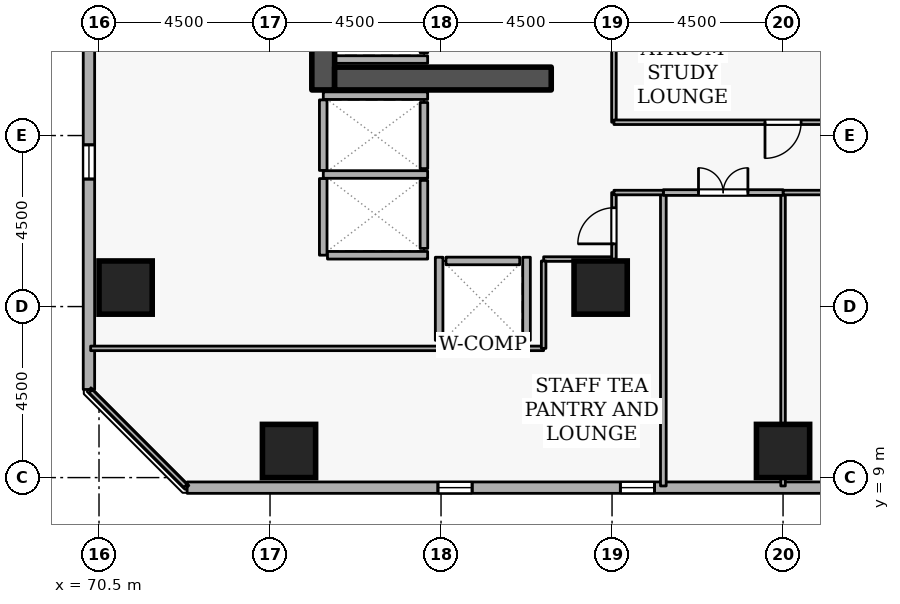
"""IFC4 building model, lengths in metres.
Left out: names, types, materials, properties, quantities, classifications, styles, units other than length and angle.
Written with IfcOpenShell. Run it as: python <this file> out.ifc"""

import sys

from ifc_helpers import new_model, si_unit, direction, frame, frame_2d, origin, origin_2d, place, context, subcontext, project, spatial, rectangle, extrude, element, fill, save


model = new_model("IFC4")
c1 = context("Model", 3, precision=1e-05, world=origin(), true_north=direction((0.0, 1.0)))
c2 = subcontext(c1, "Body", "Model", "MODEL_VIEW")
j1 = project(units=[si_unit("LENGTHUNIT", "METRE"), si_unit("PLANEANGLEUNIT", "RADIAN")], contexts=[c1])
p1 = place(None, origin())
s1 = spatial("IfcSite", under=j1, at=p1, CompositionType="ELEMENT")
p2 = place(p1, origin())
s2 = spatial("IfcBuilding", under=s1, at=p2, CompositionType="ELEMENT")
p3 = place(p2, frame((0.0, 0.0, 64.5)))
s3 = spatial("IfcBuildingStorey", under=s2, at=p3, CompositionType="ELEMENT", Elevation=64.5)
p4 = place(p3, frame((76.4, 19.2, 0.0), z_axis=(0.0, 0.0, 1.0), x_axis=(0.0, 1.0, 0.0)))
e1 = element("IfcWall", 1, at=p4, inside=s3, PredefinedType="SHEAR", context=c2, shape_type="SweptSolid", body=[
    extrude(rectangle(XDim=15.6, YDim=0.6, at=frame_2d((7.8, 0.0))), origin(), (0.0, 0.0, 1.0), 3.6),
])
p5 = place(p3, frame((76.7, 19.5, 0.0), z_axis=(0.0, 0.0, 1.0), x_axis=(1.0, 0.0, 0.0)))
e2 = element("IfcWall", 2, at=p5, inside=s3, PredefinedType="SHEAR", context=c2, shape_type="SweptSolid", body=[
    extrude(rectangle(XDim=5.7, YDim=0.6, at=frame_2d((2.85, 0.0))), origin(), (0.0, 0.0, 1.0), 3.6),
])
for number, where, z_axis, x_axis in (
    (3, (71.2, 14.0, 0.0), (0.0, 0.0, 1.0), (1.0, 0.0, 0.0)),
    (4, (88.5, 9.7, 0.0), (0.0, 0.0, 1.0), (1.0, 0.0, 0.0)),
    (5, (75.5, 9.7, 0.0), (0.0, 0.0, 1.0), (1.0, 0.0, 0.0)),
    (6, (83.7, 14.0, 0.0), (0.0, 0.0, 1.0), (1.0, 0.0, 0.0)),
):
    element("IfcColumn", number, at=place(p3, frame(where, z_axis=z_axis, x_axis=x_axis)), inside=s3, PredefinedType="COLUMN", context=c2, shape_type="SweptSolid", body=[
        extrude(rectangle(XDim=1.4, YDim=1.4, at=origin_2d()), origin(), (0.0, 0.0, 1.0), 3.6),
    ])
p6 = place(p3, frame((72.819, 8.735, 0.0), z_axis=(0.0, 0.0, 1.0), x_axis=(0.999999999457, 3.2959355e-05, 0.0)))
e7 = element("IfcWall", 7, at=p6, inside=s3, PredefinedType="STANDARD", context=c2, shape_type="SweptSolid", body=[
    extrude(rectangle(XDim=37.037, YDim=0.3, at=frame_2d((18.518, 0.0))), origin(), (0.0, 0.0, 1.0), 2.7),
])
p7 = place(p6, frame((6.6, 0.0, 0.72)))
e8 = element("IfcOpeningElement", 8, at=p7, cuts=e7, PredefinedType="OPENING", context=c2, shape_type="SweptSolid", body=[
    extrude(rectangle(XDim=0.9, YDim=1.75, at=frame_2d((0.45, 0.875))), frame((0.0, 0.16, 0.0), z_axis=(0.0, -1.0, 0.0), x_axis=(1.0, 0.0, 0.0)), (0.0, 0.0, 1.0), 0.32),
])
p8 = place(p6, frame((11.4, 0.0, 0.72)))
e9 = element("IfcOpeningElement", 9, at=p8, cuts=e7, PredefinedType="OPENING", context=c2, shape_type="SweptSolid", body=[
    extrude(rectangle(XDim=0.9, YDim=1.75, at=frame_2d((0.45, 0.875))), frame((0.0, 0.16, 0.0), z_axis=(0.0, -1.0, 0.0), x_axis=(1.0, 0.0, 0.0)), (0.0, 0.0, 1.0), 0.32),
])
p9 = place(p6, frame((21.0, 0.0, 0.72)))
e10 = element("IfcOpeningElement", 10, at=p9, cuts=e7, PredefinedType="OPENING", context=c2, shape_type="SweptSolid", body=[
    extrude(rectangle(XDim=0.9, YDim=1.75, at=frame_2d((0.45, 0.875))), frame((0.0, 0.16, 0.0), z_axis=(0.0, -1.0, 0.0), x_axis=(1.0, 0.0, 0.0)), (0.0, 0.0, 1.0), 0.32),
])
p10 = place(p6, frame((25.8, 0.0, 0.72)))
e11 = element("IfcOpeningElement", 11, at=p10, cuts=e7, PredefinedType="OPENING", context=c2, shape_type="SweptSolid", body=[
    extrude(rectangle(XDim=0.9, YDim=1.75, at=frame_2d((0.45, 0.875))), frame((0.0, 0.16, 0.0), z_axis=(0.0, -1.0, 0.0), x_axis=(1.0, 0.0, 0.0)), (0.0, 0.0, 1.0), 0.32),
])
p11 = place(p3, frame((70.236, 48.355, 0.0), z_axis=(0.0, 0.0, 1.0), x_axis=(-3.2959355e-05, -0.999999999457, 0.0)))
e12 = element("IfcWall", 12, at=p11, inside=s3, PredefinedType="STANDARD", context=c2, shape_type="SweptSolid", body=[
    extrude(rectangle(XDim=37.037, YDim=0.3, at=frame_2d((18.518, 0.0))), origin(), (0.0, 0.0, 1.0), 2.7),
])
p12 = place(p11, frame((1.8, 0.0, 0.72)))
e13 = element("IfcOpeningElement", 13, at=p12, cuts=e12, PredefinedType="OPENING", context=c2, shape_type="SweptSolid", body=[
    extrude(rectangle(XDim=0.9, YDim=1.75, at=frame_2d((0.45, 0.875))), frame((0.0, 0.16, 0.0), z_axis=(0.0, -1.0, 0.0), x_axis=(1.0, 0.0, 0.0)), (0.0, 0.0, 1.0), 0.32),
])
p13 = place(p11, frame((11.4, 0.0, 0.72)))
e14 = element("IfcOpeningElement", 14, at=p13, cuts=e12, PredefinedType="OPENING", context=c2, shape_type="SweptSolid", body=[
    extrude(rectangle(XDim=0.9, YDim=1.75, at=frame_2d((0.45, 0.875))), frame((0.0, 0.16, 0.0), z_axis=(0.0, -1.0, 0.0), x_axis=(1.0, 0.0, 0.0)), (0.0, 0.0, 1.0), 0.32),
])
p14 = place(p11, frame((16.2, 0.0, 0.72)))
e15 = element("IfcOpeningElement", 15, at=p14, cuts=e12, PredefinedType="OPENING", context=c2, shape_type="SweptSolid", body=[
    extrude(rectangle(XDim=0.9, YDim=1.75, at=frame_2d((0.45, 0.875))), frame((0.0, 0.16, 0.0), z_axis=(0.0, -1.0, 0.0), x_axis=(1.0, 0.0, 0.0)), (0.0, 0.0, 1.0), 0.32),
])
p15 = place(p11, frame((25.8, 0.0, 0.72)))
e16 = element("IfcOpeningElement", 16, at=p15, cuts=e12, PredefinedType="OPENING", context=c2, shape_type="SweptSolid", body=[
    extrude(rectangle(XDim=0.9, YDim=1.75, at=frame_2d((0.45, 0.875))), frame((0.0, 0.16, 0.0), z_axis=(0.0, -1.0, 0.0), x_axis=(1.0, 0.0, 0.0)), (0.0, 0.0, 1.0), 0.32),
])
p16 = place(p11, frame((30.6, 0.0, 0.72)))
e17 = element("IfcOpeningElement", 17, at=p16, cuts=e12, PredefinedType="OPENING", context=c2, shape_type="SweptSolid", body=[
    extrude(rectangle(XDim=0.9, YDim=1.75, at=frame_2d((0.45, 0.875))), frame((0.0, 0.16, 0.0), z_axis=(0.0, -1.0, 0.0), x_axis=(1.0, 0.0, 0.0)), (0.0, 0.0, 1.0), 0.32),
])
p17 = place(p3, frame((79.05, 20.18, 0.0), z_axis=(0.0, 0.0, 1.0), x_axis=(0.0, 1.0, 0.0)))
e18 = element("IfcWall", 18, at=p17, inside=s3, PredefinedType="STANDARD", context=c2, shape_type="SweptSolid", body=[
    extrude(rectangle(XDim=1.94, YDim=0.2, at=frame_2d((0.97, 0.0))), origin(), (0.0, 0.0, 1.0), 3.34),
])
p18 = place(p3, frame((79.05, 17.13, 0.0), z_axis=(0.0, 0.0, 1.0), x_axis=(0.0, 1.0, 0.0)))
e19 = element("IfcWall", 19, at=p18, inside=s3, PredefinedType="STANDARD", context=c2, shape_type="SweptSolid", body=[
    extrude(rectangle(XDim=1.74, YDim=0.2, at=frame_2d((0.87, 0.0))), origin(), (0.0, 0.0, 1.0), 3.34),
])
p19 = place(p3, frame((79.05, 15.03, 0.0), z_axis=(0.0, 0.0, 1.0), x_axis=(0.0, 1.0, 0.0)))
e20 = element("IfcWall", 20, at=p19, inside=s3, PredefinedType="STANDARD", context=c2, shape_type="SweptSolid", body=[
    extrude(rectangle(XDim=1.79, YDim=0.2, at=frame_2d((0.895, 0.0))), origin(), (0.0, 0.0, 1.0), 3.34),
])
p20 = place(p3, frame((79.63, 14.7, 0.0), z_axis=(0.0, 0.0, 1.0), x_axis=(1.0, 0.0, 0.0)))
e21 = element("IfcWall", 21, at=p20, inside=s3, PredefinedType="STANDARD", context=c2, shape_type="SweptSolid", body=[
    extrude(rectangle(XDim=1.94, YDim=0.2, at=frame_2d((0.97, 0.0))), origin(), (0.0, 0.0, 1.0), 3.34),
])
p21 = place(p3, frame((76.712, 20.0, 0.0), z_axis=(0.0, 0.0, 1.0), x_axis=(1.0, 0.0, 0.0)))
e22 = element("IfcWall", 22, at=p21, inside=s3, PredefinedType="STANDARD", context=c2, shape_type="SweptSolid", body=[
    extrude(rectangle(XDim=2.436, YDim=0.2, at=frame_2d((1.218, 0.0))), origin(), (0.0, 0.0, 1.0), 3.34),
])
p22 = place(p3, frame((76.402, 19.05, 0.0), z_axis=(0.0, 0.0, 1.0), x_axis=(1.0, 0.0, 0.0)))
e23 = element("IfcWall", 23, at=p22, inside=s3, PredefinedType="STANDARD", context=c2, shape_type="SweptSolid", body=[
    extrude(rectangle(XDim=2.746, YDim=0.2, at=frame_2d((1.373, 0.0))), origin(), (0.0, 0.0, 1.0), 2.545),
])
p23 = place(p3, frame((76.402, 16.975, 0.0), z_axis=(0.0, 0.0, 1.0), x_axis=(1.0, 0.0, 0.0)))
e24 = element("IfcWall", 24, at=p23, inside=s3, PredefinedType="STANDARD", context=c2, shape_type="SweptSolid", body=[
    extrude(rectangle(XDim=2.746, YDim=0.2, at=frame_2d((1.373, 0.0))), origin(), (0.0, 0.0, 1.0), 3.34),
])
p24 = place(p3, frame((76.4, 14.852, 0.0), z_axis=(0.0, 0.0, 1.0), x_axis=(0.0, 1.0, 0.0)))
e25 = element("IfcWall", 25, at=p24, inside=s3, PredefinedType="STANDARD", context=c2, shape_type="SweptSolid", body=[
    extrude(rectangle(XDim=2.016, YDim=0.2, at=frame_2d((1.008, 0.0))), origin(), (0.0, 0.0, 1.0), 3.34),
])
p25 = place(p3, frame((76.4, 17.082, 0.0), z_axis=(0.0, 0.0, 1.0), x_axis=(0.0, 1.0, 0.0)))
e26 = element("IfcWall", 26, at=p25, inside=s3, PredefinedType="STANDARD", context=c2, shape_type="SweptSolid", body=[
    extrude(rectangle(XDim=1.856, YDim=0.2, at=frame_2d((0.928, 0.0))), origin(), (0.0, 0.0, 1.0), 3.34),
])
p26 = place(p3, frame((76.512, 14.85, 0.0), z_axis=(0.0, 0.0, 1.0), x_axis=(1.0, 0.0, 0.0)))
e27 = element("IfcWall", 27, at=p26, inside=s3, PredefinedType="STANDARD", context=c2, shape_type="SweptSolid", body=[
    extrude(rectangle(XDim=2.636, YDim=0.2, at=frame_2d((1.318, 0.0))), origin(), (0.0, 0.0, 1.0), 3.34),
])
p27 = place(p3, frame((79.452, 12.5, 0.0), z_axis=(0.0, 0.0, 1.0), x_axis=(1.0, 0.0, 0.0)))
e28 = element("IfcWall", 28, at=p27, inside=s3, PredefinedType="STANDARD", context=c2, shape_type="SweptSolid", body=[
    extrude(rectangle(XDim=2.296, YDim=0.2, at=frame_2d((1.148, 0.0))), origin(), (0.0, 0.0, 1.0), 3.34),
])
for number, where, z_axis, x_axis in (
    (29, (81.75, 12.612, 0.0), (0.0, 0.0, 1.0), (0.0, 1.0, 0.0)),
    (30, (79.45, 12.612, 0.0), (0.0, 0.0, 1.0), (0.0, 1.0, 0.0)),
):
    element("IfcWall", number, at=place(p3, frame(where, z_axis=z_axis, x_axis=x_axis)), inside=s3, PredefinedType="STANDARD", context=c2, shape_type="SweptSolid", body=[
        extrude(rectangle(XDim=2.186, YDim=0.2, at=frame_2d((1.093, 0.0))), origin(), (0.0, 0.0, 1.0), 3.34),
    ])
p28 = place(p3, frame((88.5, 8.78, 0.0), z_axis=(0.0, 0.0, 1.0), x_axis=(0.0, 1.0, 0.0)))
e31 = element("IfcWall", 31, at=p28, inside=s3, PredefinedType="PARTITIONING", context=c2, shape_type="SweptSolid", body=[
    extrude(rectangle(XDim=7.72, YDim=0.12, at=frame_2d((3.86, 0.0))), origin(), (0.0, 0.0, 1.0), 2.878),
])
p29 = place(p3, frame((88.5, 16.5, 0.0), z_axis=(0.0, 0.0, 1.0), x_axis=(1.0, 0.0, 0.0)))
e32 = element("IfcWall", 32, at=p29, inside=s3, PredefinedType="PARTITIONING", context=c2, shape_type="SweptSolid", body=[
    extrude(rectangle(XDim=4.45, YDim=0.12, at=frame_2d((2.225, 0.0))), origin(), (0.0, 0.0, 1.0), 3.34),
])
p30 = place(p3, frame((85.35, 8.78, 0.0), z_axis=(0.0, 0.0, 1.0), x_axis=(0.0, 1.0, 0.0)))
e33 = element("IfcWall", 33, at=p30, inside=s3, PredefinedType="PARTITIONING", context=c2, shape_type="SweptSolid", body=[
    extrude(rectangle(XDim=7.72, YDim=0.15, at=frame_2d((3.86, 0.0))), origin(), (0.0, 0.0, 1.0), 3.34),
])
p31 = place(p3, frame((85.35, 16.5, 0.0), z_axis=(0.0, 0.0, 1.0), x_axis=(1.0, 0.0, 0.0)))
e34 = element("IfcWall", 34, at=p31, inside=s3, PredefinedType="PARTITIONING", context=c2, shape_type="SweptSolid", body=[
    extrude(rectangle(XDim=3.15, YDim=0.15, at=frame_2d((1.575, 0.0))), origin(), (0.0, 0.0, 1.0), 3.34),
])
p32 = place(p31, frame((0.925, 0.0, 0.0)))
e35 = element("IfcOpeningElement", 35, at=p32, cuts=e34, PredefinedType="OPENING", context=c2, shape_type="SweptSolid", body=[
    extrude(rectangle(XDim=1.3, YDim=2.12, at=frame_2d((0.65, 1.06))), frame((0.0, 0.085, 0.0), z_axis=(0.0, -1.0, 0.0), x_axis=(1.0, 0.0, 0.0)), (0.0, 0.0, 1.0), 0.17),
])
p33 = place(p3, frame((82.2, 14.75, 0.0), z_axis=(0.0, 0.0, 1.0), x_axis=(1.0, 0.0, 0.0)))
e36 = element("IfcWall", 36, at=p33, inside=s3, PredefinedType="PARTITIONING", context=c2, shape_type="SweptSolid", body=[
    extrude(rectangle(XDim=1.85, YDim=0.12, at=frame_2d((0.925, 0.0))), origin(), (0.0, 0.0, 1.0), 3.34),
])
p34 = place(p3, frame((84.05, 14.75, 0.0), z_axis=(0.0, 0.0, 1.0), x_axis=(0.0, 1.0, 0.0)))
e37 = element("IfcWall", 37, at=p34, inside=s3, PredefinedType="PARTITIONING", context=c2, shape_type="SweptSolid", body=[
    extrude(rectangle(XDim=1.75, YDim=0.12, at=frame_2d((0.875, 0.0))), origin(), (0.0, 0.0, 1.0), 3.34),
])
p35 = place(p34, frame((0.4, 0.0, 0.0)))
e38 = element("IfcOpeningElement", 38, at=p35, cuts=e37, PredefinedType="OPENING", context=c2, shape_type="SweptSolid", body=[
    extrude(rectangle(XDim=0.95, YDim=2.1, at=frame_2d((0.475, 1.05))), frame((0.0, 0.07, 0.0), z_axis=(0.0, -1.0, 0.0), x_axis=(1.0, 0.0, 0.0)), (0.0, 0.0, 1.0), 0.14),
])
p36 = place(p3, frame((84.05, 16.5, 0.0), z_axis=(0.0, 0.0, 1.0), x_axis=(1.0, 0.0, 0.0)))
e39 = element("IfcWall", 39, at=p36, inside=s3, PredefinedType="PARTITIONING", context=c2, shape_type="SweptSolid", body=[
    extrude(rectangle(XDim=1.3, YDim=0.12, at=frame_2d((0.65, 0.0))), origin(), (0.0, 0.0, 1.0), 3.34),
])
p37 = place(p3, frame((72.775, 8.78, 0.0), z_axis=(0.0, 0.0, 1.0), x_axis=(-0.707106781187, 0.707106781187, 0.0)))
e40 = element("IfcWall", 40, at=p37, inside=s3, PredefinedType="PARTITIONING", context=c2, shape_type="SweptSolid", body=[
    extrude(rectangle(XDim=3.528, YDim=0.12, at=frame_2d((1.764, 0.0))), origin(), (0.0, 0.0, 1.0), 3.34),
])
p38 = place(p3, frame((70.28, 12.4, 0.0), z_axis=(0.0, 0.0, 1.0), x_axis=(1.0, 0.0, 0.0)))
e41 = element("IfcWall", 41, at=p38, inside=s3, PredefinedType="PARTITIONING", context=c2, shape_type="SweptSolid", body=[
    extrude(rectangle(XDim=9.172, YDim=0.12, at=frame_2d((4.586, 0.0))), origin(), (0.0, 0.0, 1.0), 3.34),
])
p39 = place(p3, frame((81.748, 12.4, 0.0), z_axis=(0.0, 0.0, 1.0), x_axis=(1.0, 0.0, 0.0)))
e42 = element("IfcWall", 42, at=p39, inside=s3, PredefinedType="PARTITIONING", context=c2, shape_type="SweptSolid", body=[
    extrude(rectangle(XDim=0.452, YDim=0.12, at=frame_2d((0.226, 0.0))), origin(), (0.0, 0.0, 1.0), 3.34),
])
p40 = place(p3, frame((82.2, 12.4, 0.0), z_axis=(0.0, 0.0, 1.0), x_axis=(0.0, 1.0, 0.0)))
e43 = element("IfcWall", 43, at=p40, inside=s3, PredefinedType="PARTITIONING", context=c2, shape_type="SweptSolid", body=[
    extrude(rectangle(XDim=2.3, YDim=0.12, at=frame_2d((1.15, 0.0))), origin(), (0.0, 0.0, 1.0), 3.34),
])
p41 = place(p3, frame((84.05, 18.35, 0.0), z_axis=(0.0, 0.0, 1.0), x_axis=(0.0, 1.0, 0.0)))
e44 = element("IfcWall", 44, at=p41, inside=s3, PredefinedType="PARTITIONING", context=c2, shape_type="SweptSolid", body=[
    extrude(rectangle(XDim=3.45, YDim=0.12, at=frame_2d((1.725, 0.0))), origin(), (0.0, 0.0, 1.0), 3.34),
])
p42 = place(p3, frame((92.95, 18.35, 0.0), z_axis=(0.0, 0.0, 1.0), x_axis=(-1.0, 0.0, 0.0)))
e45 = element("IfcWall", 45, at=p42, inside=s3, PredefinedType="PARTITIONING", context=c2, shape_type="SweptSolid", body=[
    extrude(rectangle(XDim=8.9, YDim=0.12, at=frame_2d((4.45, 0.0))), origin(), (0.0, 0.0, 1.0), 3.34),
])
p43 = place(p42, frame((3.975, 0.0, 0.0)))
e46 = element("IfcOpeningElement", 46, at=p43, cuts=e45, PredefinedType="OPENING", context=c2, shape_type="SweptSolid", body=[
    extrude(rectangle(XDim=0.95, YDim=2.1, at=frame_2d((0.475, 1.05))), frame((0.0, 0.07, 0.0), z_axis=(0.0, -1.0, 0.0), x_axis=(1.0, 0.0, 0.0)), (0.0, 0.0, 1.0), 0.14),
])
p44 = place(p7, origin())
e47 = element("IfcWindow", 47, at=p44, inside=s3, PartitioningType="SINGLE_PANEL", PredefinedType="WINDOW", context=c2, shape_type="SweptSolid", body=[
    extrude(rectangle(XDim=0.9, YDim=1.75, at=frame_2d((0.45, 0.875))), frame((0.0, 0.03, 0.0), z_axis=(0.0, -1.0, 0.0), x_axis=(1.0, 0.0, 0.0)), (0.0, 0.0, 1.0), 0.06),
])
fill(e8, e47)
p45 = place(p8, origin())
e48 = element("IfcWindow", 48, at=p45, inside=s3, PartitioningType="SINGLE_PANEL", PredefinedType="WINDOW", context=c2, shape_type="SweptSolid", body=[
    extrude(rectangle(XDim=0.9, YDim=1.75, at=frame_2d((0.45, 0.875))), frame((0.0, 0.03, 0.0), z_axis=(0.0, -1.0, 0.0), x_axis=(1.0, 0.0, 0.0)), (0.0, 0.0, 1.0), 0.06),
])
fill(e9, e48)
p46 = place(p16, origin())
e49 = element("IfcWindow", 49, at=p46, inside=s3, PartitioningType="SINGLE_PANEL", PredefinedType="WINDOW", context=c2, shape_type="SweptSolid", body=[
    extrude(rectangle(XDim=0.9, YDim=1.75, at=frame_2d((0.45, 0.875))), frame((0.0, 0.03, 0.0), z_axis=(0.0, -1.0, 0.0), x_axis=(1.0, 0.0, 0.0)), (0.0, 0.0, 1.0), 0.06),
])
fill(e17, e49)
p47 = place(p32, origin())
e50 = element("IfcDoor", 50, at=p47, inside=s3, OperationType="DOUBLE_DOOR_SINGLE_SWING", PredefinedType="DOOR", context=c2, shape_type="SweptSolid", body=[
    extrude(rectangle(XDim=1.3, YDim=2.12, at=frame_2d((0.65, 1.06))), frame((0.0, 0.025, 0.0), z_axis=(0.0, -1.0, 0.0), x_axis=(1.0, 0.0, 0.0)), (0.0, 0.0, 1.0), 0.05),
])
fill(e35, e50)
p48 = place(p35, origin())
e51 = element("IfcDoor", 51, at=p48, inside=s3, OperationType="SINGLE_SWING_LEFT", PredefinedType="DOOR", context=c2, shape_type="SweptSolid", body=[
    extrude(rectangle(XDim=0.95, YDim=2.1, at=frame_2d((0.475, 1.05))), frame((0.0, 0.025, 0.0), z_axis=(0.0, -1.0, 0.0), x_axis=(1.0, 0.0, 0.0)), (0.0, 0.0, 1.0), 0.05),
])
fill(e38, e51)
p49 = place(p43, origin())
e52 = element("IfcDoor", 52, at=p49, inside=s3, OperationType="SINGLE_SWING_RIGHT", PredefinedType="DOOR", context=c2, shape_type="SweptSolid", body=[
    extrude(rectangle(XDim=0.95, YDim=2.1, at=frame_2d((0.475, 1.05))), frame((0.0, 0.025, 0.0), z_axis=(0.0, -1.0, 0.0), x_axis=(1.0, 0.0, 0.0)), (0.0, 0.0, 1.0), 0.05),
])
fill(e46, e52)
save(model, sys.argv[1])
